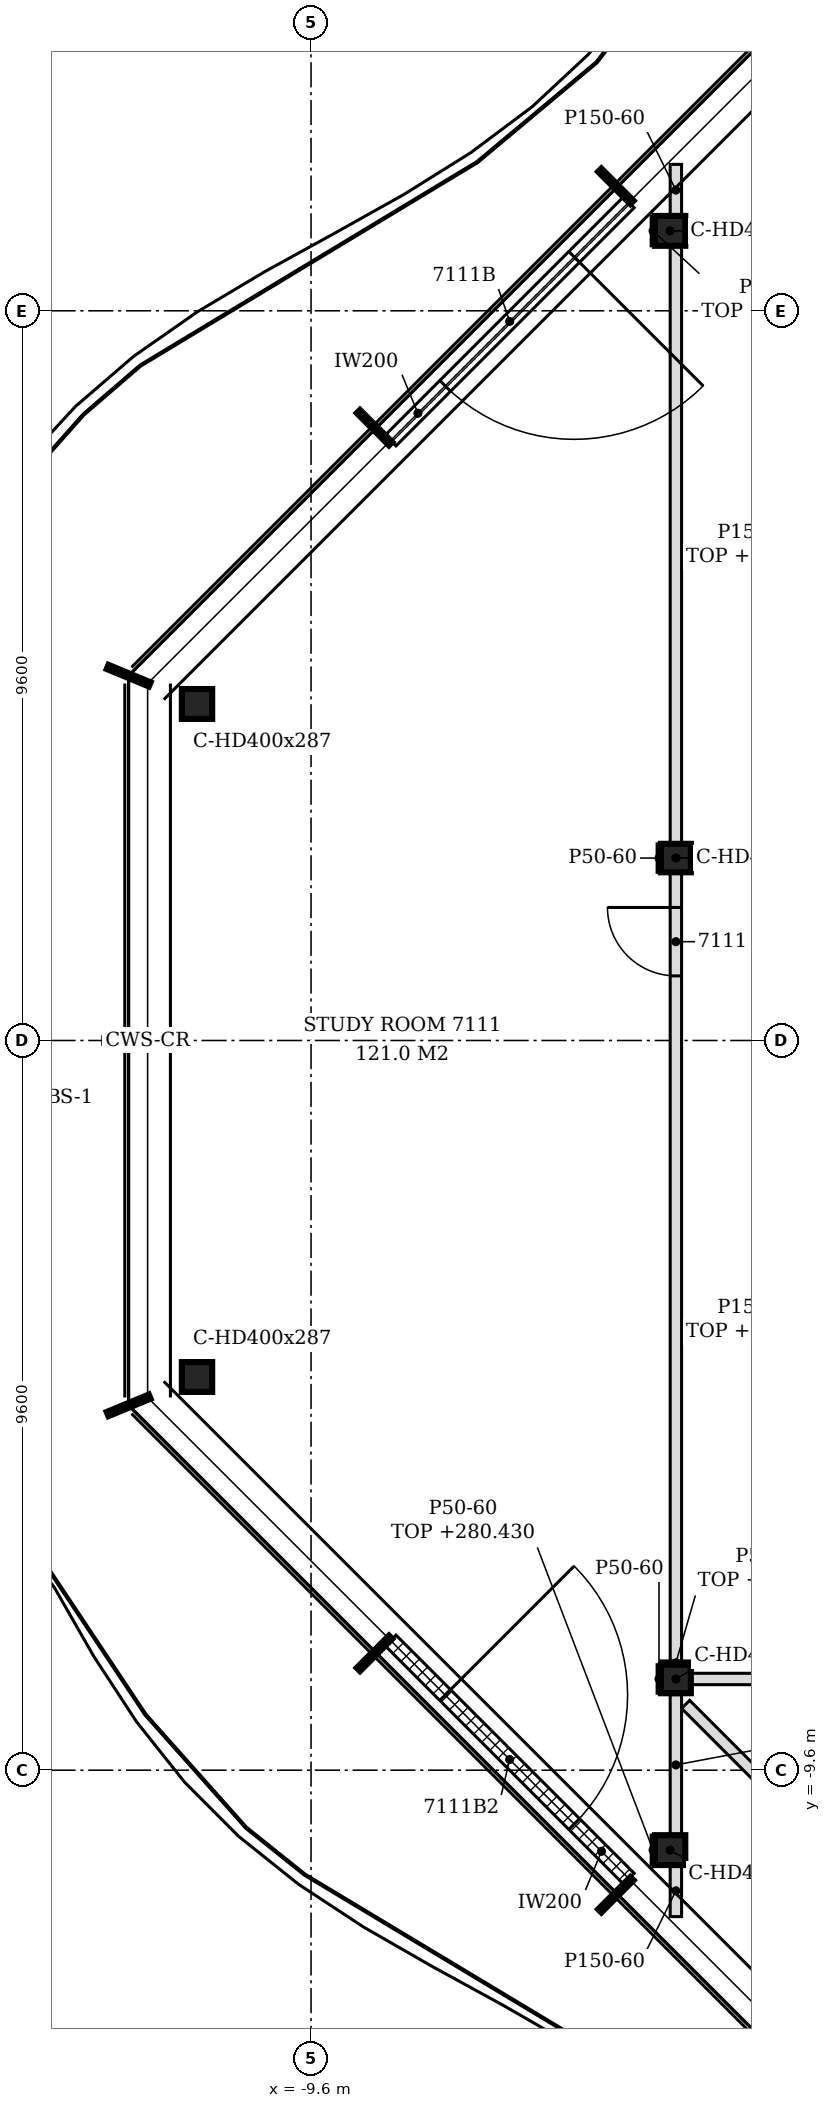
"""IFC4 building model, lengths in metres.
Left out: names, types, materials, properties, quantities, classifications, styles, units other than length and angle.
Written with IfcOpenShell. Run it as: python <this file> out.ifc"""

import sys

from ifc_helpers import new_model, si_unit, direction, frame, frame_2d, origin, origin_2d, place, context, subcontext, project, spatial, polyline, rectangle, i_section, outline, extrude, element, fill, save


model = new_model("IFC4")
c1 = context("Model", 3, precision=1e-05, world=origin(), true_north=direction((0.0, 1.0)))
c2 = subcontext(c1, "Body", "Model", "MODEL_VIEW")
j1 = project(units=[si_unit("LENGTHUNIT", "METRE"), si_unit("PLANEANGLEUNIT", "RADIAN")], contexts=[c1])
p1 = place(None, origin())
s1 = spatial("IfcSite", under=j1, at=p1, CompositionType="ELEMENT")
p2 = place(p1, origin())
s2 = spatial("IfcBuilding", under=s1, at=p2, CompositionType="ELEMENT")
p3 = place(p2, frame((0.0, 0.0, 277.8)))
s3 = spatial("IfcBuildingStorey", under=s2, at=p3, CompositionType="ELEMENT", Elevation=277.8)
for number, where, z_axis, x_axis in (
    (1, (-4.876, 10.652, -0.15), (0.0, 0.0, 1.0), (1.0, 0.0, 0.0)),
    (2, (-11.1, 4.427, -0.15), (0.0, 0.0, 1.0), (1.0, 0.0, 0.0)),
    (3, (-11.1, -4.427, -0.15), (0.0, 0.0, 1.0), (1.0, 0.0, 0.0)),
    (4, (-4.876, -10.652, -0.15), (0.0, 0.0, 1.0), (1.0, 0.0, 0.0)),
):
    element("IfcColumn", number, at=place(p3, frame(where, z_axis=z_axis, x_axis=x_axis)), inside=s3, PredefinedType="COLUMN", context=c2, shape_type="SweptSolid", body=[
        extrude(i_section(OverallWidth=0.399, OverallDepth=0.393, WebThickness=0.023, FlangeThickness=0.037, FilletRadius=0.015, at=origin_2d()), origin(), (0.0, 0.0, 1.0), 3.6),
    ])
for number, where, z_axis, x_axis in (
    (5, (-4.8, -8.4, -0.15), (0.0, 0.0, 1.0), (1.0, 0.0, 0.0)),
    (6, (-4.8, 2.4, -0.15), (0.0, 0.0, 1.0), (1.0, 0.0, 0.0)),
):
    element("IfcColumn", number, at=place(p3, frame(where, z_axis=z_axis, x_axis=x_axis)), inside=s3, PredefinedType="COLUMN", context=c2, shape_type="SweptSolid", body=[
        extrude(i_section(OverallWidth=0.394, OverallDepth=0.375, WebThickness=0.017, FlangeThickness=0.028, FilletRadius=0.015, at=origin_2d()), origin(), (0.0, 0.0, 1.0), 3.6),
    ])
p4 = place(p3, frame((-5.42, 11.026, 0.0), z_axis=(0.0, 0.0, 1.0), x_axis=(-0.707134329907, -0.707079231393, 0.0)))
e7 = element("IfcWall", 7, at=p4, inside=s3, PredefinedType="NOTDEFINED", context=c2, shape_type="SweptSolid", body=[
    extrude(rectangle(XDim=4.431, YDim=0.2, at=frame_2d((2.215, 0.0))), origin(), (0.0, 0.0, 1.0), 3.45),
])
p5 = place(p4, frame((1.015, 0.0, 0.0)))
e8 = element("IfcOpeningElement", 8, at=p5, cuts=e7, PredefinedType="OPENING", context=c2, shape_type="SweptSolid", body=[
    extrude(rectangle(XDim=2.4, YDim=2.4, at=frame_2d((1.2, 1.2))), frame((0.0, 0.11, 0.0), z_axis=(0.0, -1.0, 0.0), x_axis=(1.0, 0.0, 0.0)), (0.0, 0.0, 1.0), 0.22),
])
p6 = place(p3, frame((-8.553, -7.893, 0.0), z_axis=(0.0, 0.0, 1.0), x_axis=(0.707134329907, -0.707079231393, 0.0)))
e9 = element("IfcWall", 9, at=p6, inside=s3, PredefinedType="NOTDEFINED", context=c2, shape_type="SweptSolid", body=[
    extrude(rectangle(XDim=4.431, YDim=0.2, at=frame_2d((2.215, 0.0))), origin(), (0.0, 0.0, 1.0), 3.45),
])
p7 = place(p6, frame((1.015, 0.0, 0.0)))
e10 = element("IfcOpeningElement", 10, at=p7, cuts=e9, PredefinedType="OPENING", context=c2, shape_type="SweptSolid", body=[
    extrude(rectangle(XDim=2.4, YDim=2.4, at=frame_2d((1.2, 1.2))), frame((0.0, 0.11, 0.0), z_axis=(0.0, -1.0, 0.0), x_axis=(1.0, 0.0, 0.0)), (0.0, 0.0, 1.0), 0.22),
])
p8 = place(p3, frame((2.066, -15.472, 0.0), z_axis=(0.0, 0.0, 1.0), x_axis=(-0.707106781187, 0.707106781187, 0.0)))
e11 = element("IfcWall", 11, at=p8, inside=s3, PredefinedType="PARTITIONING", context=c2, shape_type="SweptSolid", body=[
    extrude(rectangle(XDim=9.529, YDim=0.15, at=frame_2d((4.765, 0.0))), origin(), (0.0, 0.0, 1.0), 2.98),
])
p9 = place(p3, frame((-4.8, -11.526, 0.0), z_axis=(0.0, 0.0, 1.0), x_axis=(0.0, 1.0, 0.0)))
e12 = element("IfcWall", 12, at=p9, inside=s3, PredefinedType="PARTITIONING", context=c2, shape_type="SweptSolid", body=[
    extrude(outline(polyline([(0.0, 0.0), (0.678, 0.0), (0.678, 2.63), (0.229, 2.63), (0.227, 3.45), (0.0, 3.45), (0.0, 0.0)])), frame((0.0, 0.075, 0.0), z_axis=(0.0, -1.0, 0.0), x_axis=(1.0, 0.0, 0.0)), (0.0, 0.0, 1.0), 0.15),
])
p10 = place(p3, frame((-4.8, -10.455, 0.0), z_axis=(0.0, 0.0, 1.0), x_axis=(0.0, 1.0, 0.0)))
e13 = element("IfcWall", 13, at=p10, inside=s3, PredefinedType="PARTITIONING", context=c2, shape_type="SweptSolid", body=[
    extrude(outline(polyline([(0.0, 0.0), (1.849, 0.0), (1.849, 3.03), (0.298, 3.03), (0.296, 2.63), (0.053, 2.63), (0.051, 3.03), (0.0, 3.03), (0.0, 0.0)])), frame((0.0, 0.075, 0.0), z_axis=(0.0, -1.0, 0.0), x_axis=(1.0, 0.0, 0.0)), (0.0, 0.0, 1.0), 0.15),
])
p11 = place(p3, frame((-4.603, -8.4, 0.0), z_axis=(0.0, 0.0, 1.0), x_axis=(1.0, 0.0, 0.0)))
e14 = element("IfcWall", 14, at=p11, inside=s3, PredefinedType="PARTITIONING", context=c2, shape_type="SweptSolid", body=[
    extrude(rectangle(XDim=9.478, YDim=0.15, at=frame_2d((4.739, 0.0))), origin(), (0.0, 0.0, 1.0), 2.83),
])
p12 = place(p11, frame((4.153, 0.0, 0.0)))
e15 = element("IfcOpeningElement", 15, at=p12, cuts=e14, PredefinedType="OPENING", context=c2, shape_type="SweptSolid", body=[
    extrude(rectangle(XDim=0.9, YDim=2.1, at=frame_2d((0.45, 1.05))), frame((0.0, 0.085, 0.0), z_axis=(0.0, -1.0, 0.0), x_axis=(1.0, 0.0, 0.0)), (0.0, 0.0, 1.0), 0.17),
])
p13 = place(p3, frame((-4.8, -8.212, 0.0), z_axis=(0.0, 0.0, 1.0), x_axis=(0.0, 1.0, 0.0)))
e16 = element("IfcWall", 16, at=p13, inside=s3, PredefinedType="PARTITIONING", context=c2, shape_type="SweptSolid", body=[
    extrude(rectangle(XDim=10.425, YDim=0.15, at=frame_2d((5.212, 0.0))), origin(), (0.0, 0.0, 1.0), 2.83),
])
p14 = place(p13, frame((9.062, 0.0, 0.0)))
e17 = element("IfcOpeningElement", 17, at=p14, cuts=e16, PredefinedType="OPENING", context=c2, shape_type="SweptSolid", body=[
    extrude(rectangle(XDim=0.9, YDim=2.1, at=frame_2d((0.45, 1.05))), frame((0.0, 0.085, 0.0), z_axis=(0.0, -1.0, 0.0), x_axis=(1.0, 0.0, 0.0)), (0.0, 0.0, 1.0), 0.17),
])
p15 = place(p3, frame((-4.8, 2.587, 0.0), z_axis=(0.0, 0.0, 1.0), x_axis=(0.0, 1.0, 0.0)))
e18 = element("IfcWall", 18, at=p15, inside=s3, PredefinedType="PARTITIONING", context=c2, shape_type="SweptSolid", body=[
    extrude(outline(polyline([(0.0, 0.0), (7.868, 0.0), (7.867, 2.93), (7.814, 2.93), (7.812, 2.63), (7.57, 2.63), (7.568, 2.93), (0.0, 2.93), (0.0, 0.0)])), frame((0.0, 0.075, 0.0), z_axis=(0.0, -1.0, 0.0), x_axis=(1.0, 0.0, 0.0)), (0.0, 0.0, 1.0), 0.15),
])
p16 = place(p3, frame((-4.8, 10.848, 0.0), z_axis=(0.0, 0.0, 1.0), x_axis=(0.0, 1.0, 0.0)))
e19 = element("IfcWall", 19, at=p16, inside=s3, PredefinedType="PARTITIONING", context=c2, shape_type="SweptSolid", body=[
    extrude(outline(polyline([(0.0, 0.0), (0.678, 0.0), (0.678, 3.45), (0.449, 3.45), (0.447, 2.63), (0.0, 2.63), (0.0, 0.0)])), frame((0.0, 0.075, 0.0), z_axis=(0.0, -1.0, 0.0), x_axis=(1.0, 0.0, 0.0)), (0.0, 0.0, 1.0), 0.15),
])
p17 = place(p3, frame((-5.1, -10.848, 0.0), z_axis=(0.0, 0.0, 1.0), x_axis=(0.0, 1.0, 0.0)))
e20 = element("IfcWall", 20, at=p17, inside=s3, PredefinedType="PARTITIONING", context=c2, shape_type="SweptSolid", body=[
    extrude(rectangle(XDim=0.393, YDim=0.05, at=frame_2d((0.196, 0.0))), origin(), (0.0, 0.0, 1.0), 2.63),
])
for number, where, z_axis, x_axis in (
    (21, (-5.022, -8.587, 0.0), (0.0, 0.0, 1.0), (0.0, 1.0, 0.0)),
    (22, (-5.022, 2.212, 0.0), (0.0, 0.0, 1.0), (0.0, 1.0, 0.0)),
):
    element("IfcWall", number, at=place(p3, frame(where, z_axis=z_axis, x_axis=x_axis)), inside=s3, PredefinedType="PARTITIONING", context=c2, shape_type="SweptSolid", body=[
        extrude(rectangle(XDim=0.375, YDim=0.05, at=frame_2d((0.188, 0.0))), origin(), (0.0, 0.0, 1.0), 3.45),
    ])
p18 = place(p3, frame((-5.1, 10.455, 0.0), z_axis=(0.0, 0.0, 1.0), x_axis=(0.0, 1.0, 0.0)))
e23 = element("IfcWall", 23, at=p18, inside=s3, PredefinedType="PARTITIONING", context=c2, shape_type="SweptSolid", body=[
    extrude(rectangle(XDim=0.393, YDim=0.05, at=frame_2d((0.196, 0.0))), origin(), (0.0, 0.0, 1.0), 2.63),
])
p19 = place(p3, frame((-4.997, -8.188, 0.0), z_axis=(0.0, 0.0, 1.0), x_axis=(1.0, 0.0, 0.0)))
e24 = element("IfcWall", 24, at=p19, inside=s3, PredefinedType="PARTITIONING", context=c2, shape_type="SweptSolid", body=[
    extrude(rectangle(XDim=0.394, YDim=0.05, at=frame_2d((0.197, 0.0))), origin(), (0.0, 0.0, 1.0), 2.83),
])
p20 = place(p5, origin())
e25 = element("IfcDoor", 25, at=p20, inside=s3, OperationType="SINGLE_SWING_LEFT", PredefinedType="DOOR", context=c2, shape_type="SweptSolid", body=[
    extrude(rectangle(XDim=2.4, YDim=2.4, at=frame_2d((1.2, 1.2))), frame((0.0, 0.025, 0.0), z_axis=(0.0, -1.0, 0.0), x_axis=(1.0, 0.0, 0.0)), (0.0, 0.0, 1.0), 0.05),
])
fill(e8, e25)
p21 = place(p7, origin())
e26 = element("IfcDoor", 26, at=p21, inside=s3, OperationType="SINGLE_SWING_LEFT", PredefinedType="DOOR", context=c2, shape_type="SweptSolid", body=[
    extrude(rectangle(XDim=2.4, YDim=2.4, at=frame_2d((1.2, 1.2))), frame((0.0, 0.025, 0.0), z_axis=(0.0, -1.0, 0.0), x_axis=(1.0, 0.0, 0.0)), (0.0, 0.0, 1.0), 0.05),
])
fill(e10, e26)
p22 = place(p14, origin())
e27 = element("IfcDoor", 27, at=p22, inside=s3, OperationType="SINGLE_SWING_RIGHT", PredefinedType="DOOR", context=c2, shape_type="SweptSolid", body=[
    extrude(rectangle(XDim=0.9, YDim=2.1, at=frame_2d((0.45, 1.05))), frame((0.0, 0.025, 0.0), z_axis=(0.0, -1.0, 0.0), x_axis=(1.0, 0.0, 0.0)), (0.0, 0.0, 1.0), 0.05),
])
fill(e17, e27)
save(model, sys.argv[1])
